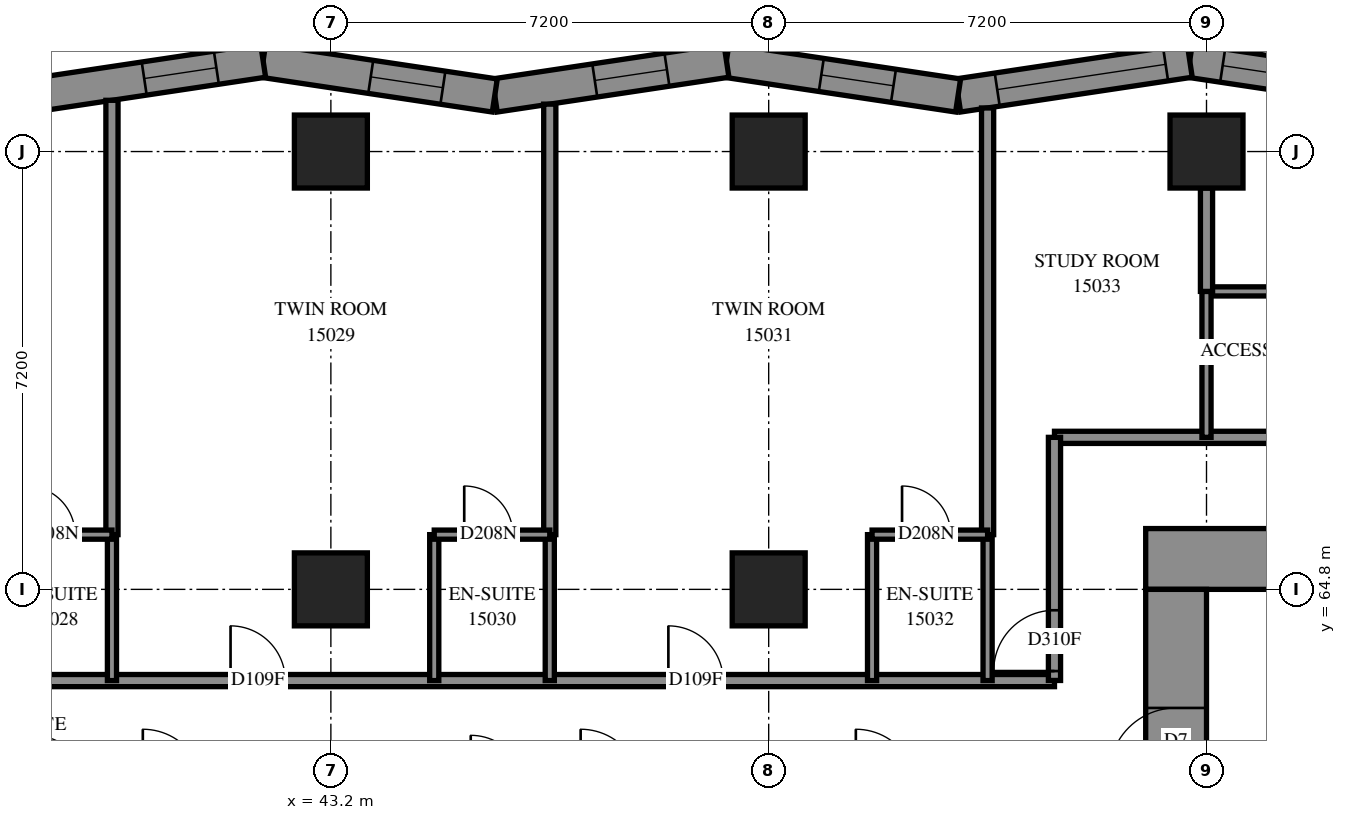
"""IFC4 building model, lengths in metres.
Left out: names, types, materials, properties, quantities, classifications, styles, units other than length and angle.
Written with IfcOpenShell. Run it as: python <this file> out.ifc"""

import sys

from ifc_helpers import new_model, si_unit, direction, frame, frame_2d, origin, origin_2d, place, context, subcontext, project, spatial, polyline, rectangle, outline, extrude, element, fill, save


model = new_model("IFC4")
c1 = context("Model", 3, precision=1e-05, world=origin(), true_north=direction((0.0, 1.0)))
c2 = subcontext(c1, "Body", "Model", "MODEL_VIEW")
j1 = project(units=[si_unit("LENGTHUNIT", "METRE"), si_unit("PLANEANGLEUNIT", "RADIAN")], contexts=[c1])
p1 = place(None, origin())
s1 = spatial("IfcSite", under=j1, at=p1, CompositionType="ELEMENT")
p2 = place(p1, origin())
s2 = spatial("IfcBuilding", under=s1, at=p2, CompositionType="ELEMENT")
p3 = place(p2, frame((0.0, 0.0, 57.6)))
s3 = spatial("IfcBuildingStorey", under=s2, at=p3, CompositionType="ELEMENT", Elevation=57.6)
for number, where, z_axis, x_axis in (
    (1, (43.2, 64.8, 0.0), (0.0, 0.0, 1.0), (1.0, 0.0, 0.0)),
    (2, (43.2, 72.0, 0.0), (0.0, 0.0, 1.0), (1.0, 0.0, 0.0)),
    (3, (50.4, 64.8, 0.0), (0.0, 0.0, 1.0), (1.0, 0.0, 0.0)),
    (4, (50.4, 72.0, 0.0), (0.0, 0.0, 1.0), (1.0, 0.0, 0.0)),
    (5, (57.6, 72.0, 0.0), (0.0, 0.0, 1.0), (1.0, 0.0, 0.0)),
):
    element("IfcColumn", number, at=place(p3, frame(where, z_axis=z_axis, x_axis=x_axis)), inside=s3, PredefinedType="COLUMN", context=c2, shape_type="SweptSolid", body=[
        extrude(rectangle(XDim=1.2, YDim=1.2, at=origin_2d()), origin(), (0.0, 0.0, 1.0), 3.1),
    ])
p4 = place(p3, frame((56.6, 65.3, -0.3), z_axis=(0.0, 0.0, 1.0), x_axis=(1.0, 0.0, 0.0)))
e6 = element("IfcWall", 6, at=p4, inside=s3, PredefinedType="SHEAR", context=c2, shape_type="SweptSolid", body=[
    extrude(rectangle(XDim=16.4, YDim=1.0, at=frame_2d((8.2, 0.0))), origin(), (0.0, 0.0, 1.0), 2.7),
])
p5 = place(p4, frame((11.0, 0.0, 0.3)))
e7 = element("IfcOpeningElement", 7, at=p5, cuts=e6, PredefinedType="OPENING", context=c2, shape_type="SweptSolid", body=[
    extrude(rectangle(XDim=0.8, YDim=2.1, at=frame_2d((0.4, 1.05))), frame((0.0, 0.51, 0.0), z_axis=(0.0, -1.0, 0.0), x_axis=(1.0, 0.0, 0.0)), (0.0, 0.0, 1.0), 1.02),
])
p6 = place(p3, frame((57.1, 50.4, -0.3), z_axis=(0.0, 0.0, 1.0), x_axis=(0.0, 1.0, 0.0)))
e8 = element("IfcWall", 8, at=p6, inside=s3, PredefinedType="SHEAR", context=c2, shape_type="SweptSolid", body=[
    extrude(rectangle(XDim=14.4, YDim=1.0, at=frame_2d((7.2, 0.0))), origin(), (0.0, 0.0, 1.0), 2.7),
])
p7 = place(p6, frame((4.55, 0.0, 0.3)))
e9 = element("IfcOpeningElement", 9, at=p7, cuts=e8, PredefinedType="OPENING", context=c2, shape_type="SweptSolid", body=[
    extrude(rectangle(XDim=1.1, YDim=2.1, at=frame_2d((0.55, 1.05))), frame((0.0, 0.51, 0.0), z_axis=(0.0, -1.0, 0.0), x_axis=(1.0, 0.0, 0.0)), (0.0, 0.0, 1.0), 1.02),
])
p8 = place(p6, frame((11.35, 0.0, 0.3)))
e10 = element("IfcOpeningElement", 10, at=p8, cuts=e8, PredefinedType="OPENING", context=c2, shape_type="SweptSolid", body=[
    extrude(rectangle(XDim=1.1, YDim=2.1, at=frame_2d((0.55, 1.05))), frame((0.0, 0.51, 0.0), z_axis=(0.0, -1.0, 0.0), x_axis=(1.0, 0.0, 0.0)), (0.0, 0.0, 1.0), 1.02),
])
p9 = place(p3, frame((61.134, 72.922, 0.0), z_axis=(0.0, 0.0, 1.0), x_axis=(-0.9889155896, 0.1484788086, 0.0)))
e11 = element("IfcWall", 11, at=p9, inside=s3, PredefinedType="SOLIDWALL", context=c2, shape_type="SweptSolid", body=[
    extrude(outline(polyline([(0.041, -0.275), (3.894, -0.275), (3.811, 0.275), (-0.041, 0.275), (0.041, -0.275)])), origin(), (0.0, 0.0, 1.0), 3.1),
])
p10 = place(p9, frame((0.505, 0.0, 0.5)))
e12 = element("IfcOpeningElement", 12, at=p10, cuts=e11, PredefinedType="OPENING", context=c2, shape_type="SweptSolid", body=[
    extrude(rectangle(XDim=2.8, YDim=2.45, at=frame_2d((1.4, 1.225))), frame((0.0, 0.285, 0.0), z_axis=(0.0, -1.0, 0.0), x_axis=(1.0, 0.0, 0.0)), (0.0, 0.0, 1.0), 0.57),
])
p11 = place(p3, frame((57.325, 73.494, 0.0), z_axis=(0.0, 0.0, 1.0), x_axis=(-0.9889155896, -0.1484788086, 0.0)))
e13 = element("IfcWall", 13, at=p11, inside=s3, PredefinedType="SOLIDWALL", context=c2, shape_type="SweptSolid", body=[
    extrude(outline(polyline([(-0.041, -0.275), (3.811, -0.275), (3.894, 0.275), (0.041, 0.275), (-0.041, -0.275)])), origin(), (0.0, 0.0, 1.0), 3.1),
])
p12 = place(p11, frame((0.402, 0.0, 0.5)))
e14 = element("IfcOpeningElement", 14, at=p12, cuts=e13, PredefinedType="OPENING", context=c2, shape_type="SweptSolid", body=[
    extrude(rectangle(XDim=2.8, YDim=2.45, at=frame_2d((1.4, 1.225))), frame((0.0, 0.285, 0.0), z_axis=(0.0, -1.0, 0.0), x_axis=(1.0, 0.0, 0.0)), (0.0, 0.0, 1.0), 0.57),
])
p13 = place(p3, frame((53.515, 72.922, 0.0), z_axis=(0.0, 0.0, 1.0), x_axis=(-0.9889150173, 0.1484826202, 0.0)))
e15 = element("IfcWall", 15, at=p13, inside=s3, PredefinedType="SOLIDWALL", context=c2, shape_type="SweptSolid", body=[
    extrude(outline(polyline([(0.041, -0.275), (3.894, -0.275), (3.811, 0.275), (-0.041, 0.275), (0.041, -0.275)])), origin(), (0.0, 0.0, 1.0), 3.1),
])
p14 = place(p13, frame((1.075, 0.0, 0.5)))
e16 = element("IfcOpeningElement", 16, at=p14, cuts=e15, PredefinedType="OPENING", context=c2, shape_type="SweptSolid", body=[
    extrude(rectangle(XDim=1.2, YDim=2.45, at=frame_2d((0.6, 1.225))), frame((0.0, 0.285, 0.0), z_axis=(0.0, -1.0, 0.0), x_axis=(1.0, 0.0, 0.0)), (0.0, 0.0, 1.0), 0.57),
])
p15 = place(p3, frame((49.705, 73.494, 0.0), z_axis=(0.0, 0.0, 1.0), x_axis=(-0.9889155896, -0.1484788086, 0.0)))
e17 = element("IfcWall", 17, at=p15, inside=s3, PredefinedType="SOLIDWALL", context=c2, shape_type="SweptSolid", body=[
    extrude(outline(polyline([(-0.041, -0.275), (3.811, -0.275), (3.894, 0.275), (0.041, 0.275), (-0.041, -0.275)])), origin(), (0.0, 0.0, 1.0), 3.1),
])
p16 = place(p15, frame((0.99, 0.0, 0.5)))
e18 = element("IfcOpeningElement", 18, at=p16, cuts=e17, PredefinedType="OPENING", context=c2, shape_type="SweptSolid", body=[
    extrude(rectangle(XDim=1.2, YDim=2.45, at=frame_2d((0.6, 1.225))), frame((0.0, 0.285, 0.0), z_axis=(0.0, -1.0, 0.0), x_axis=(1.0, 0.0, 0.0)), (0.0, 0.0, 1.0), 0.57),
])
p17 = place(p3, frame((45.896, 72.922, 0.0), z_axis=(0.0, 0.0, 1.0), x_axis=(-0.9889150173, 0.1484826202, 0.0)))
e19 = element("IfcWall", 19, at=p17, inside=s3, PredefinedType="SOLIDWALL", context=c2, shape_type="SweptSolid", body=[
    extrude(outline(polyline([(0.041, -0.275), (3.894, -0.275), (3.811, 0.275), (-0.041, 0.275), (0.041, -0.275)])), origin(), (0.0, 0.0, 1.0), 3.1),
])
p18 = place(p17, frame((0.863, 0.0, 0.5)))
e20 = element("IfcOpeningElement", 20, at=p18, cuts=e19, PredefinedType="OPENING", context=c2, shape_type="SweptSolid", body=[
    extrude(rectangle(XDim=1.2, YDim=2.45, at=frame_2d((0.6, 1.225))), frame((0.0, 0.285, 0.0), z_axis=(0.0, -1.0, 0.0), x_axis=(1.0, 0.0, 0.0)), (0.0, 0.0, 1.0), 0.57),
])
p19 = place(p3, frame((42.086, 73.494, 0.0), z_axis=(0.0, 0.0, 1.0), x_axis=(-0.9889155896, -0.1484788086, 0.0)))
e21 = element("IfcWall", 21, at=p19, inside=s3, PredefinedType="SOLIDWALL", context=c2, shape_type="SweptSolid", body=[
    extrude(outline(polyline([(-0.041, -0.275), (3.811, -0.275), (3.894, 0.275), (0.041, 0.275), (-0.041, -0.275)])), origin(), (0.0, 0.0, 1.0), 3.1),
])
p20 = place(p19, frame((0.778, 0.0, 0.5)))
e22 = element("IfcOpeningElement", 22, at=p20, cuts=e21, PredefinedType="OPENING", context=c2, shape_type="SweptSolid", body=[
    extrude(rectangle(XDim=1.2, YDim=2.45, at=frame_2d((0.6, 1.225))), frame((0.0, 0.285, 0.0), z_axis=(0.0, -1.0, 0.0), x_axis=(1.0, 0.0, 0.0)), (0.0, 0.0, 1.0), 0.57),
])
p21 = place(p3, frame((33.302, 63.3, 0.0), z_axis=(0.0, 0.0, 1.0), x_axis=(1.0, 0.0, 0.0)))
e23 = element("IfcWall", 23, at=p21, inside=s3, PredefinedType="PARTITIONING", context=c2, shape_type="SweptSolid", body=[
    extrude(rectangle(XDim=21.798, YDim=0.2, at=frame_2d((10.899, 0.0))), origin(), (0.0, 0.0, 1.0), 3.1),
])
p22 = place(p21, frame((1.091, 0.0, 0.0)))
e24 = element("IfcOpeningElement", 24, at=p22, cuts=e23, PredefinedType="OPENING", context=c2, shape_type="SweptSolid", body=[
    extrude(rectangle(XDim=0.9, YDim=2.1, at=frame_2d((0.45, 1.05))), frame((0.0, 0.11, 0.0), z_axis=(0.0, -1.0, 0.0), x_axis=(1.0, 0.0, 0.0)), (0.0, 0.0, 1.0), 0.22),
])
p23 = place(p21, frame((8.248, 0.0, 0.0)))
e25 = element("IfcOpeningElement", 25, at=p23, cuts=e23, PredefinedType="OPENING", context=c2, shape_type="SweptSolid", body=[
    extrude(rectangle(XDim=0.9, YDim=2.1, at=frame_2d((0.45, 1.05))), frame((0.0, 0.11, 0.0), z_axis=(0.0, -1.0, 0.0), x_axis=(1.0, 0.0, 0.0)), (0.0, 0.0, 1.0), 0.22),
])
p24 = place(p21, frame((15.448, 0.0, 0.0)))
e26 = element("IfcOpeningElement", 26, at=p24, cuts=e23, PredefinedType="OPENING", context=c2, shape_type="SweptSolid", body=[
    extrude(rectangle(XDim=0.9, YDim=2.1, at=frame_2d((0.45, 1.05))), frame((0.0, 0.11, 0.0), z_axis=(0.0, -1.0, 0.0), x_axis=(1.0, 0.0, 0.0)), (0.0, 0.0, 1.0), 0.22),
])
p25 = place(p3, frame((55.1, 67.3, 0.0), z_axis=(0.0, 0.0, 1.0), x_axis=(1.0, 0.0, 0.0)))
e27 = element("IfcWall", 27, at=p25, inside=s3, PredefinedType="PARTITIONING", context=c2, shape_type="SweptSolid", body=[
    extrude(rectangle(XDim=19.4, YDim=0.2, at=frame_2d((9.7, 0.0))), origin(), (0.0, 0.0, 1.0), 3.1),
])
p26 = place(p25, frame((6.361, 0.0, 0.0)))
e28 = element("IfcOpeningElement", 28, at=p26, cuts=e27, PredefinedType="OPENING", context=c2, shape_type="SweptSolid", body=[
    extrude(rectangle(XDim=0.9, YDim=2.1, at=frame_2d((0.45, 1.05))), frame((0.0, 0.11, 0.0), z_axis=(0.0, -1.0, 0.0), x_axis=(1.0, 0.0, 0.0)), (0.0, 0.0, 1.0), 0.22),
])
p27 = place(p25, frame((13.561, 0.0, 0.0)))
e29 = element("IfcOpeningElement", 29, at=p27, cuts=e27, PredefinedType="OPENING", context=c2, shape_type="SweptSolid", body=[
    extrude(rectangle(XDim=0.9, YDim=2.1, at=frame_2d((0.45, 1.05))), frame((0.0, 0.11, 0.0), z_axis=(0.0, -1.0, 0.0), x_axis=(1.0, 0.0, 0.0)), (0.0, 0.0, 1.0), 0.22),
])
p28 = place(p3, frame((39.6, 65.7, 0.0), z_axis=(0.0, 0.0, 1.0), x_axis=(0.0, 1.0, 0.0)))
e30 = element("IfcWall", 30, at=p28, inside=s3, PredefinedType="PARTITIONING", context=c2, shape_type="SweptSolid", body=[
    extrude(rectangle(XDim=7.143, YDim=0.2, at=frame_2d((3.571, 0.0))), origin(), (0.0, 0.0, 1.0), 3.1),
])
p29 = place(p3, frame((46.8, 65.7, 0.0), z_axis=(0.0, 0.0, 1.0), x_axis=(0.0, 1.0, 0.0)))
e31 = element("IfcWall", 31, at=p29, inside=s3, PredefinedType="PARTITIONING", context=c2, shape_type="SweptSolid", body=[
    extrude(rectangle(XDim=7.08, YDim=0.2, at=frame_2d((3.54, 0.0))), origin(), (0.0, 0.0, 1.0), 3.1),
])
p30 = place(p3, frame((54.0, 65.7, 0.0), z_axis=(0.0, 0.0, 1.0), x_axis=(0.0, 1.0, 0.0)))
e32 = element("IfcWall", 32, at=p30, inside=s3, PredefinedType="PARTITIONING", context=c2, shape_type="SweptSolid", body=[
    extrude(rectangle(XDim=7.017, YDim=0.2, at=frame_2d((3.508, 0.0))), origin(), (0.0, 0.0, 1.0), 3.1),
])
p31 = place(p3, frame((55.1, 63.302, 0.0), z_axis=(0.0, 0.0, 1.0), x_axis=(0.0, 1.0, 0.0)))
e33 = element("IfcWall", 33, at=p31, inside=s3, PredefinedType="PARTITIONING", context=c2, shape_type="SweptSolid", body=[
    extrude(rectangle(XDim=3.998, YDim=0.2, at=frame_2d((1.999, 0.0))), origin(), (0.0, 0.0, 1.0), 3.1),
])
p32 = place(p31, frame((0.154, 0.0, 0.0)))
e34 = element("IfcOpeningElement", 34, at=p32, cuts=e33, PredefinedType="OPENING", context=c2, shape_type="SweptSolid", body=[
    extrude(rectangle(XDim=1.0, YDim=2.1, at=frame_2d((0.5, 1.05))), frame((0.0, 0.11, 0.0), z_axis=(0.0, -1.0, 0.0), x_axis=(1.0, 0.0, 0.0)), (0.0, 0.0, 1.0), 0.22),
])
p33 = place(p3, frame((57.6, 69.7, 0.0), z_axis=(0.0, 0.0, 1.0), x_axis=(1.0, 0.0, 0.0)))
e35 = element("IfcWall", 35, at=p33, inside=s3, PredefinedType="PARTITIONING", context=c2, shape_type="SweptSolid", body=[
    extrude(rectangle(XDim=3.2, YDim=0.15, at=frame_2d((1.6, 0.0))), origin(), (0.0, 0.0, 1.0), 3.1),
])
p34 = place(p33, frame((1.196, 0.0, 0.0)))
e36 = element("IfcOpeningElement", 36, at=p34, cuts=e35, PredefinedType="OPENING", context=c2, shape_type="SweptSolid", body=[
    extrude(rectangle(XDim=0.8, YDim=2.1, at=frame_2d((0.4, 1.05))), frame((0.0, 0.085, 0.0), z_axis=(0.0, -1.0, 0.0), x_axis=(1.0, 0.0, 0.0)), (0.0, 0.0, 1.0), 0.17),
])
for number, where, z_axis, x_axis in (
    (37, (39.6, 63.3, 0.0), (0.0, 0.0, 1.0), (0.0, 1.0, 0.0)),
    (38, (44.9, 63.3, 0.0), (0.0, 0.0, 1.0), (0.0, 1.0, 0.0)),
    (39, (46.8, 63.3, 0.0), (0.0, 0.0, 1.0), (0.0, 1.0, 0.0)),
    (40, (52.1, 63.3, 0.0), (0.0, 0.0, 1.0), (0.0, 1.0, 0.0)),
    (41, (54.0, 63.3, 0.0), (0.0, 0.0, 1.0), (0.0, 1.0, 0.0)),
    (42, (57.6, 67.3, 0.0), (0.0, 0.0, 1.0), (0.0, 1.0, 0.0)),
):
    element("IfcWall", number, at=place(p3, frame(where, z_axis=z_axis, x_axis=x_axis)), inside=s3, PredefinedType="PARTITIONING", context=c2, shape_type="SweptSolid", body=[
        extrude(rectangle(XDim=2.4, YDim=0.15, at=frame_2d((1.2, 0.0))), origin(), (0.0, 0.0, 1.0), 3.1),
    ])
p35 = place(p3, frame((37.7, 65.7, 0.0), z_axis=(0.0, 0.0, 1.0), x_axis=(1.0, 0.0, 0.0)))
e43 = element("IfcWall", 43, at=p35, inside=s3, PredefinedType="PARTITIONING", context=c2, shape_type="SweptSolid", body=[
    extrude(rectangle(XDim=1.9, YDim=0.15, at=frame_2d((0.95, 0.0))), origin(), (0.0, 0.0, 1.0), 3.1),
])
p36 = place(p35, frame((0.493, 0.0, 0.0)))
e44 = element("IfcOpeningElement", 44, at=p36, cuts=e43, PredefinedType="OPENING", context=c2, shape_type="SweptSolid", body=[
    extrude(rectangle(XDim=0.8, YDim=2.1, at=frame_2d((0.4, 1.05))), frame((0.0, 0.085, 0.0), z_axis=(0.0, -1.0, 0.0), x_axis=(1.0, 0.0, 0.0)), (0.0, 0.0, 1.0), 0.17),
])
p37 = place(p3, frame((44.9, 65.7, 0.0), z_axis=(0.0, 0.0, 1.0), x_axis=(1.0, 0.0, 0.0)))
e45 = element("IfcWall", 45, at=p37, inside=s3, PredefinedType="PARTITIONING", context=c2, shape_type="SweptSolid", body=[
    extrude(rectangle(XDim=1.9, YDim=0.15, at=frame_2d((0.95, 0.0))), origin(), (0.0, 0.0, 1.0), 3.1),
])
p38 = place(p37, frame((0.493, 0.0, 0.0)))
e46 = element("IfcOpeningElement", 46, at=p38, cuts=e45, PredefinedType="OPENING", context=c2, shape_type="SweptSolid", body=[
    extrude(rectangle(XDim=0.8, YDim=2.1, at=frame_2d((0.4, 1.05))), frame((0.0, 0.085, 0.0), z_axis=(0.0, -1.0, 0.0), x_axis=(1.0, 0.0, 0.0)), (0.0, 0.0, 1.0), 0.17),
])
p39 = place(p3, frame((52.1, 65.7, 0.0), z_axis=(0.0, 0.0, 1.0), x_axis=(1.0, 0.0, 0.0)))
e47 = element("IfcWall", 47, at=p39, inside=s3, PredefinedType="PARTITIONING", context=c2, shape_type="SweptSolid", body=[
    extrude(rectangle(XDim=1.9, YDim=0.15, at=frame_2d((0.95, 0.0))), origin(), (0.0, 0.0, 1.0), 3.1),
])
p40 = place(p39, frame((0.493, 0.0, 0.0)))
e48 = element("IfcOpeningElement", 48, at=p40, cuts=e47, PredefinedType="OPENING", context=c2, shape_type="SweptSolid", body=[
    extrude(rectangle(XDim=0.8, YDim=2.1, at=frame_2d((0.4, 1.05))), frame((0.0, 0.085, 0.0), z_axis=(0.0, -1.0, 0.0), x_axis=(1.0, 0.0, 0.0)), (0.0, 0.0, 1.0), 0.17),
])
p41 = place(p3, frame((57.6, 69.7, 0.0), z_axis=(0.0, 0.0, 1.0), x_axis=(0.0, 1.0, 0.0)))
e49 = element("IfcWall", 49, at=p41, inside=s3, PredefinedType="PARTITIONING", context=c2, shape_type="SweptSolid", body=[
    extrude(rectangle(XDim=1.7, YDim=0.2, at=frame_2d((0.85, 0.0))), origin(), (0.0, 0.0, 1.0), 3.1),
])
p42 = place(p10, origin())
e50 = element("IfcWindow", 50, at=p42, inside=s3, PartitioningType="SINGLE_PANEL", PredefinedType="WINDOW", context=c2, shape_type="SweptSolid", body=[
    extrude(rectangle(XDim=2.8, YDim=2.45, at=frame_2d((1.4, 1.225))), frame((0.0, 0.155, 0.0), z_axis=(0.0, -1.0, 0.0), x_axis=(1.0, 0.0, 0.0)), (0.0, 0.0, 1.0), 0.06),
])
fill(e12, e50)
p43 = place(p12, origin())
e51 = element("IfcWindow", 51, at=p43, inside=s3, PartitioningType="SINGLE_PANEL", PredefinedType="WINDOW", context=c2, shape_type="SweptSolid", body=[
    extrude(rectangle(XDim=2.8, YDim=2.45, at=frame_2d((1.4, 1.225))), frame((0.0, 0.155, 0.0), z_axis=(0.0, -1.0, 0.0), x_axis=(1.0, 0.0, 0.0)), (0.0, 0.0, 1.0), 0.06),
])
fill(e14, e51)
p44 = place(p14, origin())
e52 = element("IfcWindow", 52, at=p44, inside=s3, PartitioningType="SINGLE_PANEL", PredefinedType="WINDOW", context=c2, shape_type="SweptSolid", body=[
    extrude(rectangle(XDim=1.2, YDim=2.45, at=frame_2d((0.6, 1.225))), frame((0.0, 0.155, 0.0), z_axis=(0.0, -1.0, 0.0), x_axis=(1.0, 0.0, 0.0)), (0.0, 0.0, 1.0), 0.06),
])
fill(e16, e52)
p45 = place(p16, origin())
e53 = element("IfcWindow", 53, at=p45, inside=s3, PartitioningType="SINGLE_PANEL", PredefinedType="WINDOW", context=c2, shape_type="SweptSolid", body=[
    extrude(rectangle(XDim=1.2, YDim=2.45, at=frame_2d((0.6, 1.225))), frame((0.0, 0.155, 0.0), z_axis=(0.0, -1.0, 0.0), x_axis=(1.0, 0.0, 0.0)), (0.0, 0.0, 1.0), 0.06),
])
fill(e18, e53)
p46 = place(p18, origin())
e54 = element("IfcWindow", 54, at=p46, inside=s3, PartitioningType="SINGLE_PANEL", PredefinedType="WINDOW", context=c2, shape_type="SweptSolid", body=[
    extrude(rectangle(XDim=1.2, YDim=2.45, at=frame_2d((0.6, 1.225))), frame((0.0, 0.155, 0.0), z_axis=(0.0, -1.0, 0.0), x_axis=(1.0, 0.0, 0.0)), (0.0, 0.0, 1.0), 0.06),
])
fill(e20, e54)
p47 = place(p20, origin())
e55 = element("IfcWindow", 55, at=p47, inside=s3, PartitioningType="SINGLE_PANEL", PredefinedType="WINDOW", context=c2, shape_type="SweptSolid", body=[
    extrude(rectangle(XDim=1.2, YDim=2.45, at=frame_2d((0.6, 1.225))), frame((0.0, 0.155, 0.0), z_axis=(0.0, -1.0, 0.0), x_axis=(1.0, 0.0, 0.0)), (0.0, 0.0, 1.0), 0.06),
])
fill(e22, e55)
p48 = place(p8, origin())
e56 = element("IfcDoor", 56, at=p48, inside=s3, OperationType="SINGLE_SWING_LEFT", PredefinedType="DOOR", context=c2, shape_type="SweptSolid", body=[
    extrude(rectangle(XDim=1.1, YDim=2.1, at=frame_2d((0.55, 1.05))), frame((0.0, 0.025, 0.0), z_axis=(0.0, -1.0, 0.0), x_axis=(1.0, 0.0, 0.0)), (0.0, 0.0, 1.0), 0.05),
])
fill(e10, e56)
p49 = place(p36, origin())
e57 = element("IfcDoor", 57, at=p49, inside=s3, OperationType="SINGLE_SWING_RIGHT", PredefinedType="DOOR", context=c2, shape_type="SweptSolid", body=[
    extrude(rectangle(XDim=0.8, YDim=2.1, at=frame_2d((0.4, 1.05))), frame((0.0, 0.025, 0.0), z_axis=(0.0, -1.0, 0.0), x_axis=(1.0, 0.0, 0.0)), (0.0, 0.0, 1.0), 0.05),
])
fill(e44, e57)
p50 = place(p23, origin())
e58 = element("IfcDoor", 58, at=p50, inside=s3, OperationType="SINGLE_SWING_LEFT", PredefinedType="DOOR", context=c2, shape_type="SweptSolid", body=[
    extrude(rectangle(XDim=0.9, YDim=2.1, at=frame_2d((0.45, 1.05))), frame((0.0, 0.025, 0.0), z_axis=(0.0, -1.0, 0.0), x_axis=(1.0, 0.0, 0.0)), (0.0, 0.0, 1.0), 0.05),
])
fill(e25, e58)
p51 = place(p38, origin())
e59 = element("IfcDoor", 59, at=p51, inside=s3, OperationType="SINGLE_SWING_RIGHT", PredefinedType="DOOR", context=c2, shape_type="SweptSolid", body=[
    extrude(rectangle(XDim=0.8, YDim=2.1, at=frame_2d((0.4, 1.05))), frame((0.0, 0.025, 0.0), z_axis=(0.0, -1.0, 0.0), x_axis=(1.0, 0.0, 0.0)), (0.0, 0.0, 1.0), 0.05),
])
fill(e46, e59)
p52 = place(p24, origin())
e60 = element("IfcDoor", 60, at=p52, inside=s3, OperationType="SINGLE_SWING_LEFT", PredefinedType="DOOR", context=c2, shape_type="SweptSolid", body=[
    extrude(rectangle(XDim=0.9, YDim=2.1, at=frame_2d((0.45, 1.05))), frame((0.0, 0.025, 0.0), z_axis=(0.0, -1.0, 0.0), x_axis=(1.0, 0.0, 0.0)), (0.0, 0.0, 1.0), 0.05),
])
fill(e26, e60)
p53 = place(p40, origin())
e61 = element("IfcDoor", 61, at=p53, inside=s3, OperationType="SINGLE_SWING_RIGHT", PredefinedType="DOOR", context=c2, shape_type="SweptSolid", body=[
    extrude(rectangle(XDim=0.8, YDim=2.1, at=frame_2d((0.4, 1.05))), frame((0.0, 0.025, 0.0), z_axis=(0.0, -1.0, 0.0), x_axis=(1.0, 0.0, 0.0)), (0.0, 0.0, 1.0), 0.05),
])
fill(e48, e61)
p54 = place(p32, origin())
e62 = element("IfcDoor", 62, at=p54, inside=s3, OperationType="SINGLE_SWING_LEFT", PredefinedType="DOOR", context=c2, shape_type="SweptSolid", body=[
    extrude(rectangle(XDim=1.0, YDim=2.1, at=frame_2d((0.5, 1.05))), frame((0.0, 0.025, 0.0), z_axis=(0.0, -1.0, 0.0), x_axis=(1.0, 0.0, 0.0)), (0.0, 0.0, 1.0), 0.05),
])
fill(e34, e62)
save(model, sys.argv[1])
